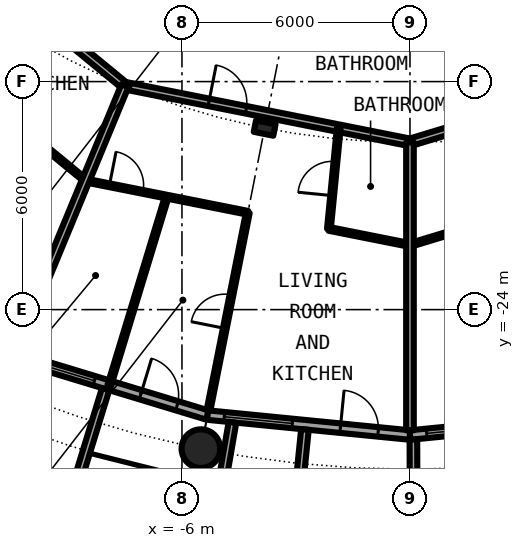
"""IFC4 building model, lengths in metres.
Left out: names, types, materials, properties, quantities, classifications, styles, units other than length and angle.
Written with IfcOpenShell. Run it as: python <this file> out.ifc"""

import sys

from ifc_helpers import new_model, si_unit, direction, frame, frame_2d, origin, origin_2d, place, context, subcontext, project, spatial, rectangle, circle, hollow_circle, i_section, extrude, element, fill, save


model = new_model("IFC4")
c1 = context("Model", 3, precision=1e-05, world=origin(), true_north=direction((0.0, 1.0)))
c2 = subcontext(c1, "Body", "Model", "MODEL_VIEW")
j1 = project(units=[si_unit("LENGTHUNIT", "METRE"), si_unit("PLANEANGLEUNIT", "RADIAN")], contexts=[c1])
p1 = place(None, origin())
s1 = spatial("IfcSite", under=j1, at=p1, CompositionType="ELEMENT")
p2 = place(p1, origin())
s2 = spatial("IfcBuilding", under=s1, at=p2, CompositionType="ELEMENT")
p3 = place(p2, frame((0.0, 0.0, 72.75)))
s3 = spatial("IfcBuildingStorey", under=s2, at=p3, CompositionType="ELEMENT", Elevation=72.75)
p4 = place(p3, frame((-5.501, -27.658, 0.0), z_axis=(0.0, 0.0, 1.0), x_axis=(1.0, 0.0, 0.0)))
e1 = element("IfcColumn", 1, at=p4, inside=s3, PredefinedType="COLUMN", context=c2, shape_type="SweptSolid", body=[
    extrude(hollow_circle(Radius=0.508, WallThickness=0.04, at=origin_2d()), origin(), (0.0, 0.0, 1.0), 3.05),
])
p5 = place(p3, frame((-3.824, -19.223, 0.0), z_axis=(0.0, 0.0, 1.0), x_axis=(-0.195090322016, -0.980785280403, 0.0)))
e2 = element("IfcColumn", 2, at=p5, inside=s3, PredefinedType="COLUMN", context=c2, shape_type="SweptSolid", body=[
    extrude(i_section(OverallWidth=0.306, OverallDepth=0.524, WebThickness=0.021, FlangeThickness=0.04, FilletRadius=0.027, at=origin_2d()), origin(), (0.0, 0.0, 1.0), 3.05),
])
p6 = place(p3, frame((-10.447, -25.222, 0.0), z_axis=(0.0, 0.0, 1.0), x_axis=(0.956965678721, -0.290201119486, 0.0)))
e3 = element("IfcWall", 3, at=p6, inside=s3, PredefinedType="SOLIDWALL", context=c2, shape_type="SweptSolid", body=[
    extrude(rectangle(XDim=5.351, YDim=0.25, at=frame_2d((2.676, 0.0))), origin(), (0.0, 0.0, 1.0), 2.7),
])
p7 = place(p6, frame((0.441, 0.0, 0.3)))
e4 = element("IfcOpeningElement", 4, at=p7, cuts=e3, PredefinedType="OPENING", context=c2, shape_type="SweptSolid", body=[
    extrude(rectangle(XDim=1.8, YDim=2.1, at=frame_2d((0.9, 1.05))), frame((0.0, 0.135, 0.0), z_axis=(0.0, -1.0, 0.0), x_axis=(1.0, 0.0, 0.0)), (0.0, 0.0, 1.0), 0.27),
])
p8 = place(p6, frame((3.51, 0.0, 0.0)))
e5 = element("IfcOpeningElement", 5, at=p8, cuts=e3, PredefinedType="OPENING", context=c2, shape_type="SweptSolid", body=[
    extrude(rectangle(XDim=1.0, YDim=2.2, at=frame_2d((0.5, 1.1))), frame((0.0, 0.135, 0.0), z_axis=(0.0, -1.0, 0.0), x_axis=(1.0, 0.0, 0.0)), (0.0, 0.0, 1.0), 0.27),
])
p9 = place(p3, frame((-11.638, -28.084, -0.03), z_axis=(0.0, 0.0, 1.0), x_axis=(0.941461077774, -0.337121697664, 0.0)))
e6 = element("IfcWall", 6, at=p9, inside=s3, PredefinedType="SOLIDWALL", context=c2, shape_type="SweptSolid", body=[
    extrude(rectangle(XDim=2.993, YDim=0.2, at=frame_2d((1.497, 0.0))), origin(), (0.0, 0.0, 1.0), 2.73),
])
p10 = place(p9, frame((0.457, 0.0, 0.33)))
e7 = element("IfcOpeningElement", 7, at=p10, cuts=e6, PredefinedType="OPENING", context=c2, shape_type="SweptSolid", body=[
    extrude(circle(Radius=1.04, at=frame_2d((1.04, 1.04))), frame((0.0, 0.11, 0.0), z_axis=(0.0, -1.0, 0.0), x_axis=(1.0, 0.0, 0.0)), (0.0, 0.0, 1.0), 0.22),
])
p11 = place(p3, frame((-8.009, -26.092, -0.03), z_axis=(0.0, 0.0, 1.0), x_axis=(-0.293406695073, -0.955987715029, 0.0)))
e8 = element("IfcWall", 8, at=p11, inside=s3, PredefinedType="SOLIDWALL", context=c2, shape_type="SweptSolid", body=[
    extrude(rectangle(XDim=3.006, YDim=0.2, at=frame_2d((1.503, 0.0))), origin(), (0.0, 0.0, 1.0), 2.73),
])
p12 = place(p3, frame((-5.326, -26.775, 0.0), z_axis=(0.0, 0.0, 1.0), x_axis=(0.995173996315, -0.098126026407, 0.0)))
e9 = element("IfcWall", 9, at=p12, inside=s3, PredefinedType="SOLIDWALL", context=c2, shape_type="SweptSolid", body=[
    extrude(rectangle(XDim=5.352, YDim=0.25, at=frame_2d((2.676, 0.0))), origin(), (0.0, 0.0, 1.0), 2.7),
])
p13 = place(p12, frame((0.441, 0.0, 0.3)))
e10 = element("IfcOpeningElement", 10, at=p13, cuts=e9, PredefinedType="OPENING", context=c2, shape_type="SweptSolid", body=[
    extrude(rectangle(XDim=1.8, YDim=2.1, at=frame_2d((0.9, 1.05))), frame((0.0, 0.135, 0.0), z_axis=(0.0, -1.0, 0.0), x_axis=(1.0, 0.0, 0.0)), (0.0, 0.0, 1.0), 0.27),
])
p14 = place(p12, frame((3.51, 0.0, 0.0)))
e11 = element("IfcOpeningElement", 11, at=p14, cuts=e9, PredefinedType="OPENING", context=c2, shape_type="SweptSolid", body=[
    extrude(rectangle(XDim=1.0, YDim=2.2, at=frame_2d((0.5, 1.1))), frame((0.0, 0.135, 0.0), z_axis=(0.0, -1.0, 0.0), x_axis=(1.0, 0.0, 0.0)), (0.0, 0.0, 1.0), 0.27),
])
p15 = place(p3, frame((-4.671, -26.966, -0.03), z_axis=(0.0, 0.0, 1.0), x_axis=(-0.170539878907, -0.985350774954, 0.0)))
e12 = element("IfcWall", 12, at=p15, inside=s3, PredefinedType="SOLIDWALL", context=c2, shape_type="SweptSolid", body=[
    extrude(rectangle(XDim=2.932, YDim=0.2, at=frame_2d((1.466, 0.0))), origin(), (0.0, 0.0, 1.0), 2.73),
])
p16 = place(p3, frame((-2.764, -27.153, -0.03), z_axis=(0.0, 0.0, 1.0), x_axis=(-0.101505487237, -0.994834979311, 0.0)))
e13 = element("IfcWall", 13, at=p16, inside=s3, PredefinedType="SOLIDWALL", context=c2, shape_type="SweptSolid", body=[
    extrude(rectangle(XDim=3.007, YDim=0.2, at=frame_2d((1.503, 0.0))), origin(), (0.0, 0.0, 1.0), 2.73),
])
p17 = place(p3, frame((0.0, -27.3, 0.0), z_axis=(0.0, 0.0, 1.0), x_axis=(0.995173996315, 0.098126026407, 0.0)))
e14 = element("IfcWall", 14, at=p17, inside=s3, PredefinedType="SOLIDWALL", context=c2, shape_type="SweptSolid", body=[
    extrude(rectangle(XDim=5.352, YDim=0.25, at=frame_2d((2.676, 0.0))), origin(), (0.0, 0.0, 1.0), 2.7),
])
p18 = place(p17, frame((0.441, 0.0, 0.3)))
e15 = element("IfcOpeningElement", 15, at=p18, cuts=e14, PredefinedType="OPENING", context=c2, shape_type="SweptSolid", body=[
    extrude(rectangle(XDim=1.8, YDim=2.1, at=frame_2d((0.9, 1.05))), frame((0.0, 0.135, 0.0), z_axis=(0.0, -1.0, 0.0), x_axis=(1.0, 0.0, 0.0)), (0.0, 0.0, 1.0), 0.27),
])
p19 = place(p17, frame((3.51, 0.0, 0.0)))
e16 = element("IfcOpeningElement", 16, at=p19, cuts=e14, PredefinedType="OPENING", context=c2, shape_type="SweptSolid", body=[
    extrude(rectangle(XDim=1.0, YDim=2.2, at=frame_2d((0.5, 1.1))), frame((0.0, 0.135, 0.0), z_axis=(0.0, -1.0, 0.0), x_axis=(1.0, 0.0, 0.0)), (0.0, 0.0, 1.0), 0.27),
])
p20 = place(p3, frame((0.09, -27.417, -0.03), z_axis=(0.0, 0.0, 1.0), x_axis=(0.00347308367, -0.999993968827, 0.0)))
e17 = element("IfcWall", 17, at=p20, inside=s3, PredefinedType="SOLIDWALL", context=c2, shape_type="SweptSolid", body=[
    extrude(rectangle(XDim=2.882, YDim=0.2, at=frame_2d((1.441, 0.0))), origin(), (0.0, 0.0, 1.0), 2.73),
])
p21 = place(p3, frame((-8.536, -20.603, 0.0), z_axis=(0.0, 0.0, 1.0), x_axis=(0.980795826794, -0.195037294239, 0.0)))
e18 = element("IfcWall", 18, at=p21, inside=s3, PredefinedType="PARTITIONING", context=c2, shape_type="SweptSolid", body=[
    extrude(rectangle(XDim=4.352, YDim=0.1, at=frame_2d((2.176, 0.0))), origin(), (0.0, 0.0, 1.0), 2.7),
])
p22 = place(p21, frame((0.639, 0.0, 0.0)))
e19 = element("IfcOpeningElement", 19, at=p22, cuts=e18, PredefinedType="OPENING", context=c2, shape_type="SweptSolid", body=[
    extrude(rectangle(XDim=0.9, YDim=2.3, at=frame_2d((0.45, 1.15))), frame((0.0, 0.06, 0.0), z_axis=(0.0, -1.0, 0.0), x_axis=(1.0, 0.0, 0.0)), (0.0, 0.0, 1.0), 0.12),
])
p23 = place(p3, frame((-2.133, -21.876, 0.0), z_axis=(0.0, 0.0, 1.0), x_axis=(0.980804550577, -0.194993419292, 0.0)))
e20 = element("IfcWall", 20, at=p23, inside=s3, PredefinedType="PARTITIONING", context=c2, shape_type="SweptSolid", body=[
    extrude(rectangle(XDim=2.175, YDim=0.1, at=frame_2d((1.087, 0.0))), origin(), (0.0, 0.0, 1.0), 2.7),
])
p24 = place(p3, frame((-13.538, -16.496, 0.0), z_axis=(0.0, 0.0, 1.0), x_axis=(0.773000340237, -0.634405606843, 0.0)))
e21 = element("IfcWall", 21, at=p24, inside=s3, PredefinedType="PARTITIONING", context=c2, shape_type="SweptSolid", body=[
    extrude(rectangle(XDim=6.474, YDim=0.1, at=frame_2d((3.237, 0.0))), origin(), (0.0, 0.0, 1.0), 2.7),
])
p25 = place(p3, frame((0.0, -22.3, 0.0), z_axis=(0.0, 0.0, 1.0), x_axis=(0.956940987612, 0.290282528286, 0.0)))
e22 = element("IfcWall", 22, at=p25, inside=s3, PredefinedType="PARTITIONING", context=c2, shape_type="SweptSolid", body=[
    extrude(rectangle(XDim=6.477, YDim=0.1, at=frame_2d((3.238, 0.0))), origin(), (0.0, 0.0, 1.0), 2.7),
])
p26 = place(p3, frame((-7.501, -18.108, 0.0), z_axis=(0.0, 0.0, 1.0), x_axis=(0.980781515054, -0.195109250749, 0.0)))
e23 = element("IfcWall", 23, at=p26, inside=s3, PredefinedType="PARTITIONING", context=c2, shape_type="SweptSolid", body=[
    extrude(rectangle(XDim=7.648, YDim=0.2, at=frame_2d((3.824, 0.0))), origin(), (0.0, 0.0, 1.0), 2.38),
])
p27 = place(p26, frame((2.25, 0.0, 0.0)))
e24 = element("IfcOpeningElement", 24, at=p27, cuts=e23, PredefinedType="OPENING", context=c2, shape_type="SweptSolid", body=[
    extrude(rectangle(XDim=1.0, YDim=2.3, at=frame_2d((0.5, 1.15))), frame((0.0, 0.11, 0.0), z_axis=(0.0, -1.0, 0.0), x_axis=(1.0, 0.0, 0.0)), (0.0, 0.0, 1.0), 0.22),
])
p28 = place(p3, frame((-16.172, -10.99, 0.0), z_axis=(0.0, 0.0, 1.0), x_axis=(0.772669779479, -0.634808169355, 0.0)))
e25 = element("IfcWall", 25, at=p28, inside=s3, PredefinedType="PARTITIONING", context=c2, shape_type="SweptSolid", body=[
    extrude(rectangle(XDim=11.208, YDim=0.2, at=frame_2d((5.604, 0.0))), origin(), (0.0, 0.0, 1.0), 2.38),
])
p29 = place(p28, frame((3.135, 0.0, 0.0)))
e26 = element("IfcOpeningElement", 26, at=p29, cuts=e25, PredefinedType="OPENING", context=c2, shape_type="SweptSolid", body=[
    extrude(rectangle(XDim=1.0, YDim=2.3, at=frame_2d((0.5, 1.15))), frame((0.0, 0.11, 0.0), z_axis=(0.0, -1.0, 0.0), x_axis=(1.0, 0.0, 0.0)), (0.0, 0.0, 1.0), 0.22),
])
p30 = place(p3, frame((0.0, -19.6, 0.0), z_axis=(0.0, 0.0, 1.0), x_axis=(0.956932298225, 0.290311172044, 0.0)))
e27 = element("IfcWall", 27, at=p30, inside=s3, PredefinedType="PARTITIONING", context=c2, shape_type="SweptSolid", body=[
    extrude(rectangle(XDim=11.219, YDim=0.2, at=frame_2d((5.61, 0.0))), origin(), (0.0, 0.0, 1.0), 2.38),
])
p31 = place(p30, frame((7.086, 0.0, 0.0)))
e28 = element("IfcOpeningElement", 28, at=p31, cuts=e27, PredefinedType="OPENING", context=c2, shape_type="SweptSolid", body=[
    extrude(rectangle(XDim=1.0, YDim=2.3, at=frame_2d((0.5, 1.15))), frame((0.0, 0.11, 0.0), z_axis=(0.0, -1.0, 0.0), x_axis=(1.0, 0.0, 0.0)), (0.0, 0.0, 1.0), 0.22),
])
p32 = place(p3, frame((-10.399, -25.106, 0.0), z_axis=(0.0, 0.0, 1.0), x_axis=(0.382600411313, 0.923913916587, 0.0)))
e29 = element("IfcWall", 29, at=p32, inside=s3, PredefinedType="PARTITIONING", context=c2, shape_type="SweptSolid", body=[
    extrude(rectangle(XDim=7.574, YDim=0.2, at=frame_2d((3.787, 0.0))), origin(), (0.0, 0.0, 1.0), 2.7),
])
p33 = place(p3, frame((-7.913, -25.997, 0.0), z_axis=(0.0, 0.0, 1.0), x_axis=(0.291264462755, 0.956642573136, 0.0)))
e30 = element("IfcWall", 30, at=p33, inside=s3, PredefinedType="PARTITIONING", context=c2, shape_type="SweptSolid", body=[
    extrude(rectangle(XDim=5.195, YDim=0.1, at=frame_2d((2.598, 0.0))), origin(), (0.0, 0.0, 1.0), 2.7),
])
p34 = place(p3, frame((-5.302, -26.653, 0.0), z_axis=(0.0, 0.0, 1.0), x_axis=(0.195115793364, 0.980780213493, 0.0)))
e31 = element("IfcWall", 31, at=p34, inside=s3, PredefinedType="PARTITIONING", context=c2, shape_type="SweptSolid", body=[
    extrude(rectangle(XDim=5.304, YDim=0.1, at=frame_2d((2.652, 0.0))), origin(), (0.0, 0.0, 1.0), 2.7),
])
p35 = place(p34, frame((2.202, 0.0, 0.0)))
e32 = element("IfcOpeningElement", 32, at=p35, cuts=e31, PredefinedType="OPENING", context=c2, shape_type="SweptSolid", body=[
    extrude(rectangle(XDim=0.9, YDim=2.3, at=frame_2d((0.45, 1.15))), frame((0.0, 0.06, 0.0), z_axis=(0.0, -1.0, 0.0), x_axis=(1.0, 0.0, 0.0)), (0.0, 0.0, 1.0), 0.12),
])
p36 = place(p3, frame((-2.133, -21.876, 0.0), z_axis=(0.0, 0.0, 1.0), x_axis=(0.096960338807, 0.995288246036, 0.0)))
e33 = element("IfcWall", 33, at=p36, inside=s3, PredefinedType="PARTITIONING", context=c2, shape_type="SweptSolid", body=[
    extrude(rectangle(XDim=2.661, YDim=0.1, at=frame_2d((1.331, 0.0))), origin(), (0.0, 0.0, 1.0), 2.7),
])
p37 = place(p36, frame((0.881, 0.0, 0.0)))
e34 = element("IfcOpeningElement", 34, at=p37, cuts=e33, PredefinedType="OPENING", context=c2, shape_type="SweptSolid", body=[
    extrude(rectangle(XDim=0.9, YDim=2.3, at=frame_2d((0.45, 1.15))), frame((0.0, 0.06, 0.0), z_axis=(0.0, -1.0, 0.0), x_axis=(1.0, 0.0, 0.0)), (0.0, 0.0, 1.0), 0.12),
])
p38 = place(p3, frame((0.0, -27.175, 0.0), z_axis=(0.0, 0.0, 1.0), x_axis=(0.0, 1.0, 0.0)))
e35 = element("IfcWall", 35, at=p38, inside=s3, PredefinedType="PARTITIONING", context=c2, shape_type="SweptSolid", body=[
    extrude(rectangle(XDim=7.575, YDim=0.2, at=frame_2d((3.788, 0.0))), origin(), (0.0, 0.0, 1.0), 2.7),
])
p39 = place(p7, origin())
e36 = element("IfcWindow", 36, at=p39, inside=s3, PartitioningType="SINGLE_PANEL", PredefinedType="WINDOW", context=c2, shape_type="SweptSolid", body=[
    extrude(rectangle(XDim=1.8, YDim=2.1, at=frame_2d((0.9, 1.05))), frame((0.0, 0.03, 0.0), z_axis=(0.0, -1.0, 0.0), x_axis=(1.0, 0.0, 0.0)), (0.0, 0.0, 1.0), 0.06),
])
fill(e4, e36)
p40 = place(p8, origin())
e37 = element("IfcDoor", 37, at=p40, inside=s3, OperationType="SINGLE_SWING_LEFT", PredefinedType="DOOR", context=c2, shape_type="SweptSolid", body=[
    extrude(rectangle(XDim=1.0, YDim=2.2, at=frame_2d((0.5, 1.1))), frame((0.0, 0.025, 0.0), z_axis=(0.0, -1.0, 0.0), x_axis=(1.0, 0.0, 0.0)), (0.0, 0.0, 1.0), 0.05),
])
fill(e5, e37)
p41 = place(p13, origin())
e38 = element("IfcWindow", 38, at=p41, inside=s3, PartitioningType="SINGLE_PANEL", PredefinedType="WINDOW", context=c2, shape_type="SweptSolid", body=[
    extrude(rectangle(XDim=1.8, YDim=2.1, at=frame_2d((0.9, 1.05))), frame((0.0, 0.03, 0.0), z_axis=(0.0, -1.0, 0.0), x_axis=(1.0, 0.0, 0.0)), (0.0, 0.0, 1.0), 0.06),
])
fill(e10, e38)
p42 = place(p14, origin())
e39 = element("IfcDoor", 39, at=p42, inside=s3, OperationType="SINGLE_SWING_LEFT", PredefinedType="DOOR", context=c2, shape_type="SweptSolid", body=[
    extrude(rectangle(XDim=1.0, YDim=2.2, at=frame_2d((0.5, 1.1))), frame((0.0, 0.025, 0.0), z_axis=(0.0, -1.0, 0.0), x_axis=(1.0, 0.0, 0.0)), (0.0, 0.0, 1.0), 0.05),
])
fill(e11, e39)
p43 = place(p18, origin())
e40 = element("IfcWindow", 40, at=p43, inside=s3, PartitioningType="SINGLE_PANEL", PredefinedType="WINDOW", context=c2, shape_type="SweptSolid", body=[
    extrude(rectangle(XDim=1.8, YDim=2.1, at=frame_2d((0.9, 1.05))), frame((0.0, 0.03, 0.0), z_axis=(0.0, -1.0, 0.0), x_axis=(1.0, 0.0, 0.0)), (0.0, 0.0, 1.0), 0.06),
])
fill(e15, e40)
p44 = place(p27, origin())
e41 = element("IfcDoor", 41, at=p44, inside=s3, OperationType="SINGLE_SWING_LEFT", PredefinedType="DOOR", context=c2, shape_type="SweptSolid", body=[
    extrude(rectangle(XDim=1.0, YDim=2.3, at=frame_2d((0.5, 1.15))), frame((0.0, 0.025, 0.0), z_axis=(0.0, -1.0, 0.0), x_axis=(1.0, 0.0, 0.0)), (0.0, 0.0, 1.0), 0.05),
])
fill(e24, e41)
p45 = place(p37, origin())
e42 = element("IfcDoor", 42, at=p45, inside=s3, OperationType="SINGLE_SWING_LEFT", PredefinedType="DOOR", context=c2, shape_type="SweptSolid", body=[
    extrude(rectangle(XDim=0.9, YDim=2.3, at=frame_2d((0.45, 1.15))), frame((0.0, 0.025, 0.0), z_axis=(0.0, -1.0, 0.0), x_axis=(1.0, 0.0, 0.0)), (0.0, 0.0, 1.0), 0.05),
])
fill(e34, e42)
p46 = place(p35, origin())
e43 = element("IfcDoor", 43, at=p46, inside=s3, OperationType="SINGLE_SWING_LEFT", PredefinedType="DOOR", context=c2, shape_type="SweptSolid", body=[
    extrude(rectangle(XDim=0.9, YDim=2.3, at=frame_2d((0.45, 1.15))), frame((0.0, 0.025, 0.0), z_axis=(0.0, -1.0, 0.0), x_axis=(1.0, 0.0, 0.0)), (0.0, 0.0, 1.0), 0.05),
])
fill(e32, e43)
p47 = place(p22, origin())
e44 = element("IfcDoor", 44, at=p47, inside=s3, OperationType="SINGLE_SWING_LEFT", PredefinedType="DOOR", context=c2, shape_type="SweptSolid", body=[
    extrude(rectangle(XDim=0.9, YDim=2.3, at=frame_2d((0.45, 1.15))), frame((0.0, 0.025, 0.0), z_axis=(0.0, -1.0, 0.0), x_axis=(1.0, 0.0, 0.0)), (0.0, 0.0, 1.0), 0.05),
])
fill(e19, e44)
save(model, sys.argv[1])
